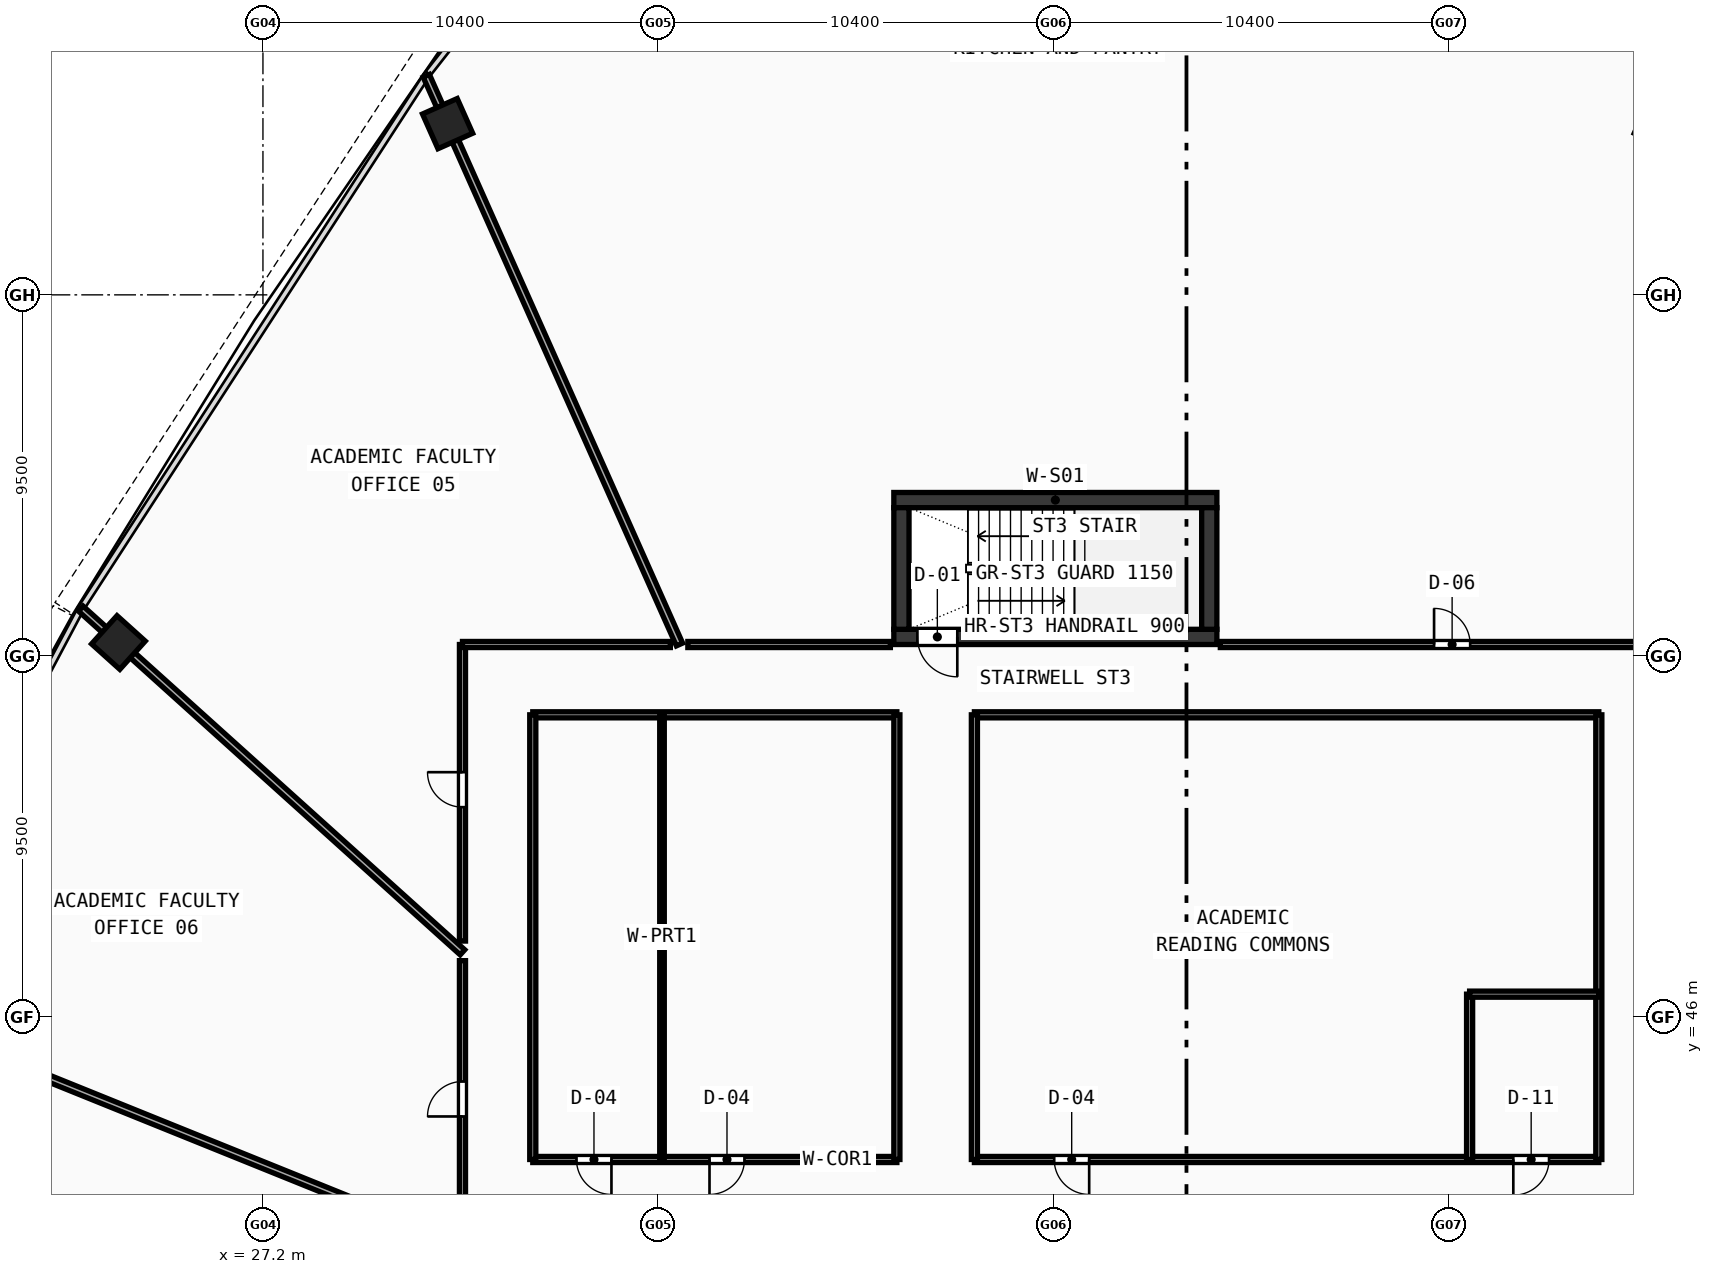
"""IFC4 building model, lengths in metres.
Left out: names, types, materials, properties, quantities, classifications, styles, units other than length and angle.
Written with IfcOpenShell. Run it as: python <this file> out.ifc"""

import sys

from ifc_helpers import new_model, si_unit, direction, frame, frame_2d, origin, origin_with_axes, origin_2d, place, context, subcontext, project, spatial, rectangle, hollow_rectangle, extrude, source, transform, mapped, element, fill, save


model = new_model("IFC4")
c1 = context("Model", 3, precision=1e-05, world=origin(), true_north=direction((0.0, 1.0)))
c2 = subcontext(c1, "Body", "Model", "MODEL_VIEW")
j1 = project(units=[si_unit("LENGTHUNIT", "METRE"), si_unit("PLANEANGLEUNIT", "RADIAN")], contexts=[c1])
p1 = place(None, origin())
s1 = spatial("IfcSite", under=j1, at=p1, CompositionType="ELEMENT")
p2 = place(p1, origin())
s2 = spatial("IfcBuilding", under=s1, at=p2, CompositionType="ELEMENT")
p3 = place(p2, frame((0.0, 0.0, 115.38)))
s3 = spatial("IfcBuildingStorey", under=s2, at=p3, CompositionType="ELEMENT", Elevation=115.38)
p4 = place(p3, frame((43.8, 59.6, 0.0), z_axis=(0.0, 0.0, 1.0), x_axis=(1.0, 0.0, 0.0)))
e1 = element("IfcWall", 1, at=p4, inside=s3, PredefinedType="SHEAR", context=c2, shape_type="SweptSolid", body=[
    extrude(rectangle(XDim=8.5, YDim=0.4, at=frame_2d((4.25, 0.0))), origin(), (0.0, 0.0, 1.0), 3.52),
])
p5 = place(p3, frame((43.8, 56.0, 0.0), z_axis=(0.0, 0.0, 1.0), x_axis=(1.0, 0.0, 0.0)))
e2 = element("IfcWall", 2, at=p5, inside=s3, PredefinedType="SHEAR", context=c2, shape_type="SweptSolid", body=[
    extrude(rectangle(XDim=8.5, YDim=0.4, at=frame_2d((4.25, 0.0))), origin(), (0.0, 0.0, 1.0), 3.52),
])
p6 = place(p5, frame((0.62, 0.0, 0.0)))
e3 = element("IfcOpeningElement", 3, at=p6, cuts=e2, PredefinedType="OPENING", context=c2, shape_type="SweptSolid", body=[
    extrude(rectangle(XDim=1.05, YDim=2.1, at=frame_2d((0.525, 1.05))), frame((0.0, 0.21, 0.0), z_axis=(0.0, -1.0, 0.0), x_axis=(1.0, 0.0, 0.0)), (0.0, 0.0, 1.0), 0.42),
])
for number, where, z_axis, x_axis in (
    (4, (44.0, 56.2, 0.0), (0.0, 0.0, 1.0), (0.0, 1.0, 0.0)),
    (5, (52.1, 56.2, 0.0), (0.0, 0.0, 1.0), (0.0, 1.0, 0.0)),
):
    element("IfcWall", number, at=place(p3, frame(where, z_axis=z_axis, x_axis=x_axis)), inside=s3, PredefinedType="SHEAR", context=c2, shape_type="SweptSolid", body=[
        extrude(rectangle(XDim=3.2, YDim=0.4, at=frame_2d((1.6, 0.0))), origin(), (0.0, 0.0, 1.0), 3.52),
    ])
m1 = source(origin(), c2, "Body", "SweptSolid", [
    extrude(hollow_rectangle(XDim=1.0, YDim=1.0, WallThickness=0.042, at=origin_2d()), origin(), (0.0, 0.0, 1.0), 3.78),
])
for number, where, z_axis, x_axis in (
    (6, (32.059, 69.505, -0.26), (0.0, 0.0, 1.0), (-0.914, -0.407, 0.0)),
    (7, (23.397, 55.852, -0.26), (0.0, 0.0, 1.0), (-0.669, -0.743, 0.0)),
):
    element("IfcColumn", number, at=place(p3, frame(where, z_axis=z_axis, x_axis=x_axis)), inside=s3, PredefinedType="COLUMN", context=c2, shape_type="MappedRepresentation", body=[
        mapped(m1, transform((0.0, 0.0, 0.0), scale=1.0)),
    ])
p7 = place(p3, frame((34.3, 42.25, 0.0), z_axis=(0.0, 0.0, 1.0), x_axis=(1.0, 0.0, 0.0)))
e8 = element("IfcWall", 8, at=p7, inside=s3, PredefinedType="PARTITIONING", context=c2, shape_type="SweptSolid", body=[
    extrude(rectangle(XDim=9.58, YDim=0.16, at=frame_2d((4.79, 0.0))), origin(), (0.0, 0.0, 1.0), 2.82),
])
p8 = place(p7, frame((1.15, 0.0, 0.0)))
e9 = element("IfcOpeningElement", 9, at=p8, cuts=e8, PredefinedType="OPENING", context=c2, shape_type="SweptSolid", body=[
    extrude(rectangle(XDim=0.92, YDim=2.1, at=frame_2d((0.46, 1.05))), frame((0.0, 0.09, 0.0), z_axis=(0.0, -1.0, 0.0), x_axis=(1.0, 0.0, 0.0)), (0.0, 0.0, 1.0), 0.18),
])
p9 = place(p7, frame((4.65, 0.0, 0.0)))
e10 = element("IfcOpeningElement", 10, at=p9, cuts=e8, PredefinedType="OPENING", context=c2, shape_type="SweptSolid", body=[
    extrude(rectangle(XDim=0.92, YDim=2.1, at=frame_2d((0.46, 1.05))), frame((0.0, 0.09, 0.0), z_axis=(0.0, -1.0, 0.0), x_axis=(1.0, 0.0, 0.0)), (0.0, 0.0, 1.0), 0.18),
])
p10 = place(p3, frame((34.3, 53.95, 0.0), z_axis=(0.0, 0.0, 1.0), x_axis=(1.0, 0.0, 0.0)))
e11 = element("IfcWall", 11, at=p10, inside=s3, PredefinedType="PARTITIONING", context=c2, shape_type="SweptSolid", body=[
    extrude(rectangle(XDim=9.58, YDim=0.16, at=frame_2d((4.79, 0.0))), origin(), (0.0, 0.0, 1.0), 2.82),
])
for number, where, z_axis, x_axis in (
    (12, (34.3, 42.25, 0.0), (0.0, 0.0, 1.0), (0.0, 1.0, 0.0)),
    (13, (43.88, 42.25, 0.0), (0.0, 0.0, 1.0), (0.0, 1.0, 0.0)),
):
    element("IfcWall", number, at=place(p3, frame(where, z_axis=z_axis, x_axis=x_axis)), inside=s3, PredefinedType="PARTITIONING", context=c2, shape_type="SweptSolid", body=[
        extrude(rectangle(XDim=11.7, YDim=0.16, at=frame_2d((5.85, 0.0))), origin(), (0.0, 0.0, 1.0), 2.82),
    ])
p11 = place(p3, frame((37.7, 42.25, 0.0), z_axis=(0.0, 0.0, 1.0), x_axis=(0.0, 1.0, 0.0)))
e14 = element("IfcWall", 14, at=p11, inside=s3, PredefinedType="PARTITIONING", context=c2, shape_type="SweptSolid", body=[
    extrude(rectangle(XDim=11.7, YDim=0.12, at=frame_2d((5.85, 0.0))), origin(), (0.0, 0.0, 1.0), 2.82),
])
p12 = place(p3, frame((45.92, 42.25, 0.0), z_axis=(0.0, 0.0, 1.0), x_axis=(1.0, 0.0, 0.0)))
e15 = element("IfcWall", 15, at=p12, inside=s3, PredefinedType="PARTITIONING", context=c2, shape_type="SweptSolid", body=[
    extrude(rectangle(XDim=16.43, YDim=0.16, at=frame_2d((8.215, 0.0))), origin(), (0.0, 0.0, 1.0), 2.82),
])
p13 = place(p12, frame((2.1, 0.0, 0.0)))
e16 = element("IfcOpeningElement", 16, at=p13, cuts=e15, PredefinedType="OPENING", context=c2, shape_type="SweptSolid", body=[
    extrude(rectangle(XDim=0.92, YDim=2.1, at=frame_2d((0.46, 1.05))), frame((0.0, 0.09, 0.0), z_axis=(0.0, -1.0, 0.0), x_axis=(1.0, 0.0, 0.0)), (0.0, 0.0, 1.0), 0.18),
])
p14 = place(p12, frame((14.18, 0.0, 0.0)))
e17 = element("IfcOpeningElement", 17, at=p14, cuts=e15, PredefinedType="OPENING", context=c2, shape_type="SweptSolid", body=[
    extrude(rectangle(XDim=0.94, YDim=2.1, at=frame_2d((0.47, 1.05))), frame((0.0, 0.09, 0.0), z_axis=(0.0, -1.0, 0.0), x_axis=(1.0, 0.0, 0.0)), (0.0, 0.0, 1.0), 0.18),
])
p15 = place(p3, frame((45.92, 53.95, 0.0), z_axis=(0.0, 0.0, 1.0), x_axis=(1.0, 0.0, 0.0)))
e18 = element("IfcWall", 18, at=p15, inside=s3, PredefinedType="PARTITIONING", context=c2, shape_type="SweptSolid", body=[
    extrude(rectangle(XDim=16.43, YDim=0.16, at=frame_2d((8.215, 0.0))), origin(), (0.0, 0.0, 1.0), 2.82),
])
p16 = place(p3, frame((45.92, 42.25, 0.0), z_axis=(0.0, 0.0, 1.0), x_axis=(0.0, 1.0, 0.0)))
e19 = element("IfcWall", 19, at=p16, inside=s3, PredefinedType="PARTITIONING", context=c2, shape_type="SweptSolid", body=[
    extrude(rectangle(XDim=11.7, YDim=0.16, at=frame_2d((5.85, 0.0))), origin(), (0.0, 0.0, 1.0), 3.12),
])
p17 = place(p3, frame((62.35, 42.25, 0.0), z_axis=(0.0, 0.0, 1.0), x_axis=(0.0, 1.0, 0.0)))
e20 = element("IfcWall", 20, at=p17, inside=s3, PredefinedType="PARTITIONING", context=c2, shape_type="SweptSolid", body=[
    extrude(rectangle(XDim=11.7, YDim=0.16, at=frame_2d((5.85, 0.0))), origin(), (0.0, 0.0, 1.0), 2.82),
])
p18 = place(p3, frame((58.95, 42.25, 0.0), z_axis=(0.0, 0.0, 1.0), x_axis=(0.0, 1.0, 0.0)))
e21 = element("IfcWall", 21, at=p18, inside=s3, PredefinedType="PARTITIONING", context=c2, shape_type="SweptSolid", body=[
    extrude(rectangle(XDim=4.35, YDim=0.16, at=frame_2d((2.175, 0.0))), origin(), (0.0, 0.0, 1.0), 2.82),
])
p19 = place(p3, frame((58.95, 46.6, 0.0), z_axis=(0.0, 0.0, 1.0), x_axis=(1.0, 0.0, 0.0)))
e22 = element("IfcWall", 22, at=p19, inside=s3, PredefinedType="PARTITIONING", context=c2, shape_type="SweptSolid", body=[
    extrude(rectangle(XDim=3.4, YDim=0.16, at=frame_2d((1.7, 0.0))), origin(), (0.0, 0.0, 1.0), 2.82),
])
p20 = place(p3, frame((38.16, 55.8, 0.0), z_axis=(0.0, 0.0, 1.0), x_axis=(-0.406727469891, 0.913549541753, 0.0)))
e23 = element("IfcWall", 23, at=p20, inside=s3, PredefinedType="PARTITIONING", context=c2, shape_type="SweptSolid", body=[
    extrude(rectangle(XDim=16.381, YDim=0.18, at=frame_2d((8.19, 0.0))), origin(), (0.0, 0.0, 1.0), 2.82),
])
p21 = place(p3, frame((32.45, 47.701, 0.0), z_axis=(0.0, 0.0, 1.0), x_axis=(-0.743139607037, 0.669136401979, 0.0)))
e24 = element("IfcWall", 24, at=p21, inside=s3, PredefinedType="PARTITIONING", context=c2, shape_type="SweptSolid", body=[
    extrude(rectangle(XDim=13.513, YDim=0.18, at=frame_2d((6.756, 0.0))), origin(), (0.0, 0.0, 1.0), 2.82),
])
p22 = place(p3, frame((32.45, 39.983, 0.0), z_axis=(0.0, 0.0, 1.0), x_axis=(-0.927182599154, 0.374609700656, 0.0)))
e25 = element("IfcWall", 25, at=p22, inside=s3, PredefinedType="PARTITIONING", context=c2, shape_type="SweptSolid", body=[
    extrude(rectangle(XDim=16.818, YDim=0.18, at=frame_2d((8.409, 0.0))), origin(), (0.0, 0.0, 1.0), 2.82),
])
p23 = place(p3, frame((32.45, 40.22, 0.0), z_axis=(0.0, 0.0, 1.0), x_axis=(0.0, 1.0, 0.0)))
e26 = element("IfcWall", 26, at=p23, inside=s3, PredefinedType="PARTITIONING", context=c2, shape_type="SweptSolid", body=[
    extrude(rectangle(XDim=7.262, YDim=0.16, at=frame_2d((3.631, 0.0))), origin(), (0.0, 0.0, 1.0), 2.82),
])
p24 = place(p23, frame((3.162, 0.0, 0.0)))
e27 = element("IfcOpeningElement", 27, at=p24, cuts=e26, PredefinedType="OPENING", context=c2, shape_type="SweptSolid", body=[
    extrude(rectangle(XDim=0.92, YDim=2.1, at=frame_2d((0.46, 1.05))), frame((0.0, 0.09, 0.0), z_axis=(0.0, -1.0, 0.0), x_axis=(1.0, 0.0, 0.0)), (0.0, 0.0, 1.0), 0.18),
])
p25 = place(p3, frame((32.45, 47.997, 0.0), z_axis=(0.0, 0.0, 1.0), x_axis=(0.0, 1.0, 0.0)))
e28 = element("IfcWall", 28, at=p25, inside=s3, PredefinedType="PARTITIONING", context=c2, shape_type="SweptSolid", body=[
    extrude(rectangle(XDim=7.803, YDim=0.16, at=frame_2d((3.901, 0.0))), origin(), (0.0, 0.0, 1.0), 3.12),
])
p26 = place(p25, frame((3.523, 0.0, 0.0)))
e29 = element("IfcOpeningElement", 29, at=p26, cuts=e28, PredefinedType="OPENING", context=c2, shape_type="SweptSolid", body=[
    extrude(rectangle(XDim=0.92, YDim=2.1, at=frame_2d((0.46, 1.05))), frame((0.0, 0.09, 0.0), z_axis=(0.0, -1.0, 0.0), x_axis=(1.0, 0.0, 0.0)), (0.0, 0.0, 1.0), 0.18),
])
p27 = place(p3, frame((32.45, 55.8, 0.0), z_axis=(0.0, 0.0, 1.0), x_axis=(1.0, 0.0, 0.0)))
e30 = element("IfcWall", 30, at=p27, inside=s3, PredefinedType="PARTITIONING", context=c2, shape_type="SweptSolid", body=[
    extrude(rectangle(XDim=5.47, YDim=0.16, at=frame_2d((2.735, 0.0))), origin(), (0.0, 0.0, 1.0), 3.12),
])
p28 = place(p3, frame((38.38, 55.8, 0.0), z_axis=(0.0, 0.0, 1.0), x_axis=(1.0, 0.0, 0.0)))
e31 = element("IfcWall", 31, at=p28, inside=s3, PredefinedType="PARTITIONING", context=c2, shape_type="SweptSolid", body=[
    extrude(rectangle(XDim=5.329, YDim=0.16, at=frame_2d((2.665, 0.0))), origin(), (0.0, 0.0, 1.0), 2.82),
])
p29 = place(p3, frame((52.391, 55.8, 0.0), z_axis=(0.0, 0.0, 1.0), x_axis=(1.0, 0.0, 0.0)))
e32 = element("IfcWall", 32, at=p29, inside=s3, PredefinedType="PARTITIONING", context=c2, shape_type="SweptSolid", body=[
    extrude(rectangle(XDim=11.809, YDim=0.16, at=frame_2d((5.904, 0.0))), origin(), (0.0, 0.0, 1.0), 2.82),
])
p30 = place(p29, frame((5.624, 0.0, 0.0)))
e33 = element("IfcOpeningElement", 33, at=p30, cuts=e32, PredefinedType="OPENING", context=c2, shape_type="SweptSolid", body=[
    extrude(rectangle(XDim=0.95, YDim=2.1, at=frame_2d((0.475, 1.05))), frame((0.0, 0.09, 0.0), z_axis=(0.0, -1.0, 0.0), x_axis=(1.0, 0.0, 0.0)), (0.0, 0.0, 1.0), 0.18),
])
m2 = source(origin(), c2, "Body", "SweptSolid", [
    extrude(rectangle(XDim=1.05, YDim=2.1, at=frame_2d((0.525, 1.05))), frame((0.0, 0.025, 0.0), z_axis=(0.0, -1.0, 0.0), x_axis=(1.0, 0.0, 0.0)), (0.0, 0.0, 1.0), 0.05),
])
p31 = place(p6, frame((1.05, 0.0, 0.0), z_axis=(0.0, 0.0, 1.0), x_axis=(-1.0, 0.0, 0.0)))
e34 = element("IfcDoor", 34, at=p31, inside=s3, OperationType="SINGLE_SWING_LEFT", PredefinedType="DOOR", context=c2, shape_type="MappedRepresentation", body=[
    mapped(m2, transform((0.0, 0.0, 0.0), scale=1.0)),
])
fill(e3, e34)
m3 = source(origin(), c2, "Body", "SweptSolid", [
    extrude(rectangle(XDim=0.92, YDim=2.1, at=frame_2d((0.46, 1.05))), frame((0.0, 0.025, 0.0), z_axis=(0.0, -1.0, 0.0), x_axis=(1.0, 0.0, 0.0)), (0.0, 0.0, 1.0), 0.05),
])
p32 = place(p8, frame((0.92, 0.0, 0.0), z_axis=(0.0, 0.0, 1.0), x_axis=(-1.0, 0.0, 0.0)))
e35 = element("IfcDoor", 35, at=p32, inside=s3, OperationType="SINGLE_SWING_LEFT", PredefinedType="DOOR", context=c2, shape_type="MappedRepresentation", body=[
    mapped(m3, transform((0.0, 0.0, 0.0), scale=1.0)),
])
fill(e9, e35)
p33 = place(p9, frame((0.92, 0.0, 0.0), z_axis=(0.0, 0.0, 1.0), x_axis=(-1.0, 0.0, 0.0)))
e36 = element("IfcDoor", 36, at=p33, inside=s3, OperationType="SINGLE_SWING_RIGHT", PredefinedType="DOOR", context=c2, shape_type="MappedRepresentation", body=[
    mapped(m3, transform((0.0, 0.0, 0.0), scale=1.0)),
])
fill(e10, e36)
p34 = place(p13, frame((0.92, 0.0, 0.0), z_axis=(0.0, 0.0, 1.0), x_axis=(-1.0, 0.0, 0.0)))
e37 = element("IfcDoor", 37, at=p34, inside=s3, OperationType="SINGLE_SWING_LEFT", PredefinedType="DOOR", context=c2, shape_type="MappedRepresentation", body=[
    mapped(m3, transform((0.0, 0.0, 0.0), scale=1.0)),
])
fill(e16, e37)
m4 = source(origin(), c2, "Body", "SweptSolid", [
    extrude(rectangle(XDim=0.94, YDim=2.1, at=frame_2d((0.47, 1.05))), frame((0.0, 0.025, 0.0), z_axis=(0.0, -1.0, 0.0), x_axis=(1.0, 0.0, 0.0)), (0.0, 0.0, 1.0), 0.05),
])
p35 = place(p14, frame((0.94, 0.0, 0.0), z_axis=(0.0, 0.0, 1.0), x_axis=(-1.0, 0.0, 0.0)))
e38 = element("IfcDoor", 38, at=p35, inside=s3, OperationType="SINGLE_SWING_RIGHT", PredefinedType="DOOR", context=c2, shape_type="MappedRepresentation", body=[
    mapped(m4, transform((0.0, 0.0, 0.0), scale=1.0)),
])
fill(e17, e38)
m5 = source(origin(), c2, "Body", "SweptSolid", [
    extrude(rectangle(XDim=0.95, YDim=2.1, at=frame_2d((0.475, 1.05))), frame((0.0, 0.025, 0.0), z_axis=(0.0, -1.0, 0.0), x_axis=(1.0, 0.0, 0.0)), (0.0, 0.0, 1.0), 0.05),
])
p36 = place(p30, origin_with_axes())
e39 = element("IfcDoor", 39, at=p36, inside=s3, OperationType="SINGLE_SWING_LEFT", PredefinedType="DOOR", context=c2, shape_type="MappedRepresentation", body=[
    mapped(m5, transform((0.0, 0.0, 0.0), scale=1.0)),
])
fill(e33, e39)
p37 = place(p26, origin_with_axes())
e40 = element("IfcDoor", 40, at=p37, inside=s3, OperationType="SINGLE_SWING_RIGHT", PredefinedType="DOOR", context=c2, shape_type="MappedRepresentation", body=[
    mapped(m3, transform((0.0, 0.0, 0.0), scale=1.0)),
])
fill(e29, e40)
p38 = place(p24, origin_with_axes())
e41 = element("IfcDoor", 41, at=p38, inside=s3, OperationType="SINGLE_SWING_LEFT", PredefinedType="DOOR", context=c2, shape_type="MappedRepresentation", body=[
    mapped(m3, transform((0.0, 0.0, 0.0), scale=1.0)),
])
fill(e27, e41)
save(model, sys.argv[1])
